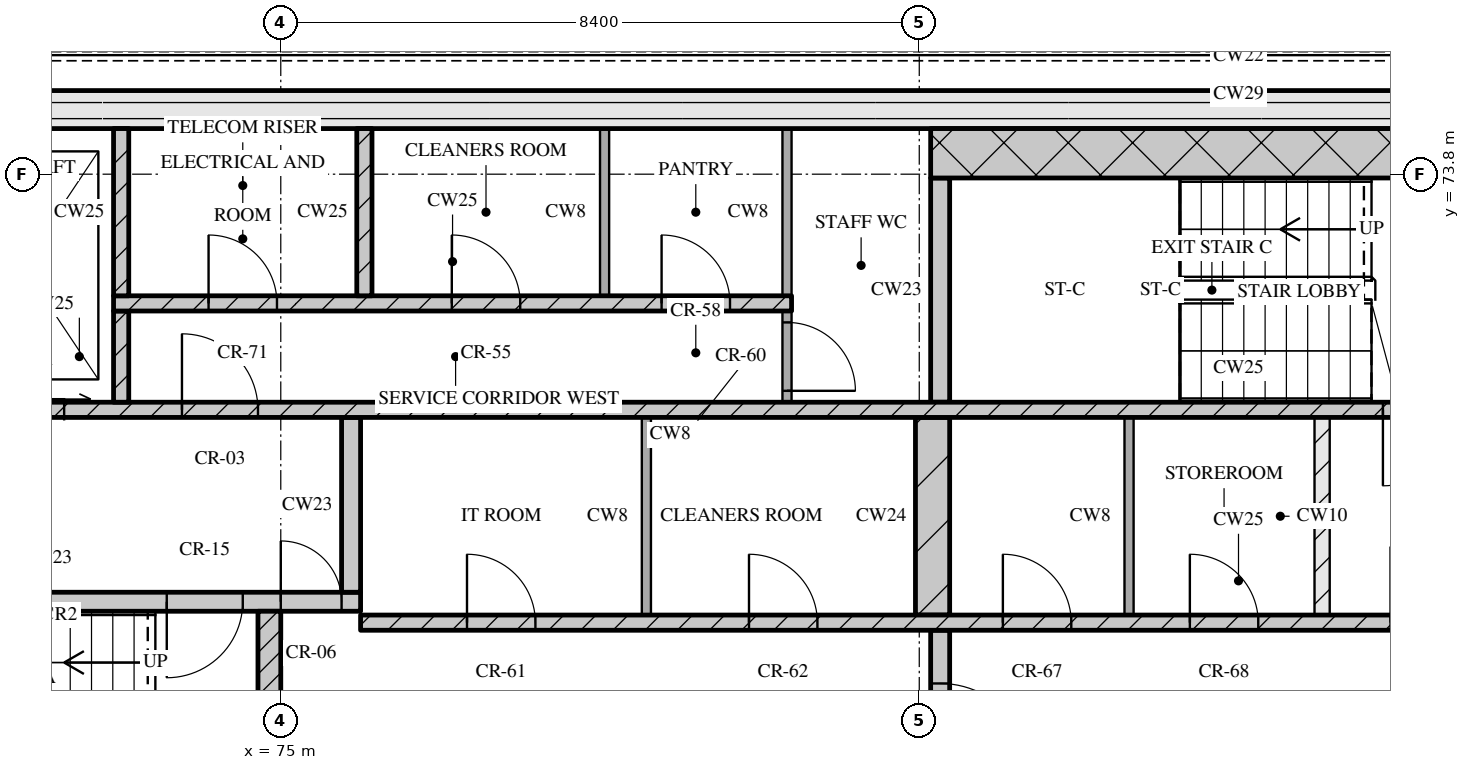
"""IFC4 building model, lengths in metres.
Left out: names, types, materials, properties, quantities, classifications, styles, units other than length and angle.
Written with IfcOpenShell. Run it as: python <this file> out.ifc"""

import sys

from ifc_helpers import new_model, si_unit, direction, frame, frame_2d, origin, place, context, subcontext, project, spatial, rectangle, extrude, element, fill, save


model = new_model("IFC4")
c1 = context("Model", 3, precision=1e-05, world=origin(), true_north=direction((0.0, 1.0)))
c2 = subcontext(c1, "Body", "Model", "MODEL_VIEW")
j1 = project(units=[si_unit("LENGTHUNIT", "METRE"), si_unit("PLANEANGLEUNIT", "RADIAN")], contexts=[c1])
p1 = place(None, origin())
s1 = spatial("IfcSite", under=j1, at=p1, CompositionType="ELEMENT")
p2 = place(p1, origin())
s2 = spatial("IfcBuilding", under=s1, at=p2, CompositionType="ELEMENT")
p3 = place(p2, frame((0.0, 0.0, 306.75)))
s3 = spatial("IfcBuildingStorey", under=s2, at=p3, CompositionType="ELEMENT", Elevation=306.75)
p4 = place(p3, frame((67.3, 74.65, 0.0), z_axis=(0.0, 0.0, 1.0), x_axis=(1.0, 0.0, 0.0)))
e1 = element("IfcWall", 1, at=p4, inside=s3, PredefinedType="SOLIDWALL", context=c2, shape_type="SweptSolid", body=[
    extrude(rectangle(XDim=40.6, YDim=0.5, at=frame_2d((20.3, 0.0))), origin(), (0.0, 0.0, 1.0), 3.3),
])
p5 = place(p3, frame((74.85, 65.2, 0.0), z_axis=(0.0, 0.0, 1.0), x_axis=(0.0, 1.0, 0.0)))
e2 = element("IfcWall", 2, at=p5, inside=s3, PredefinedType="SOLIDWALL", context=c2, shape_type="SweptSolid", body=[
    extrude(rectangle(XDim=2.85, YDim=0.3, at=frame_2d((1.425, 0.0))), origin(), (0.0, 0.0, 1.0), 3.3),
])
p6 = place(p3, frame((83.675, 65.2, 0.0), z_axis=(0.0, 0.0, 1.0), x_axis=(0.0, 1.0, 0.0)))
e3 = element("IfcWall", 3, at=p6, inside=s3, PredefinedType="SOLIDWALL", context=c2, shape_type="SweptSolid", body=[
    extrude(rectangle(XDim=2.6, YDim=0.25, at=frame_2d((1.3, 0.0))), origin(), (0.0, 0.0, 1.0), 3.3),
])
p7 = place(p6, frame((0.7, 0.0, 0.0)))
e4 = element("IfcOpeningElement", 4, at=p7, cuts=e3, PredefinedType="OPENING", context=c2, shape_type="SweptSolid", body=[
    extrude(rectangle(XDim=1.2, YDim=2.1, at=frame_2d((0.6, 1.05))), frame((0.0, 0.135, 0.0), z_axis=(0.0, -1.0, 0.0), x_axis=(1.0, 0.0, 0.0)), (0.0, 0.0, 1.0), 0.27),
])
p8 = place(p3, frame((76.05, 67.9, 0.0), z_axis=(0.0, 0.0, 1.0), x_axis=(1.0, 0.0, 0.0)))
e5 = element("IfcWall", 5, at=p8, inside=s3, PredefinedType="SOLIDWALL", context=c2, shape_type="SweptSolid", body=[
    extrude(rectangle(XDim=23.1, YDim=0.2, at=frame_2d((11.55, 0.0))), origin(), (0.0, 0.0, 1.0), 3.3),
])
p9 = place(p8, frame((1.4, 0.0, 0.0)))
e6 = element("IfcOpeningElement", 6, at=p9, cuts=e5, PredefinedType="OPENING", context=c2, shape_type="SweptSolid", body=[
    extrude(rectangle(XDim=0.9, YDim=2.1, at=frame_2d((0.45, 1.05))), frame((0.0, 0.11, 0.0), z_axis=(0.0, -1.0, 0.0), x_axis=(1.0, 0.0, 0.0)), (0.0, 0.0, 1.0), 0.22),
])
p10 = place(p8, frame((5.11, 0.0, 0.0)))
e7 = element("IfcOpeningElement", 7, at=p10, cuts=e5, PredefinedType="OPENING", context=c2, shape_type="SweptSolid", body=[
    extrude(rectangle(XDim=0.9, YDim=2.1, at=frame_2d((0.45, 1.05))), frame((0.0, 0.11, 0.0), z_axis=(0.0, -1.0, 0.0), x_axis=(1.0, 0.0, 0.0)), (0.0, 0.0, 1.0), 0.22),
])
p11 = place(p8, frame((8.45, 0.0, 0.0)))
e8 = element("IfcOpeningElement", 8, at=p11, cuts=e5, PredefinedType="OPENING", context=c2, shape_type="SweptSolid", body=[
    extrude(rectangle(XDim=0.9, YDim=2.1, at=frame_2d((0.45, 1.05))), frame((0.0, 0.11, 0.0), z_axis=(0.0, -1.0, 0.0), x_axis=(1.0, 0.0, 0.0)), (0.0, 0.0, 1.0), 0.22),
])
p12 = place(p8, frame((10.91, 0.0, 0.0)))
e9 = element("IfcOpeningElement", 9, at=p12, cuts=e5, PredefinedType="OPENING", context=c2, shape_type="SweptSolid", body=[
    extrude(rectangle(XDim=0.9, YDim=2.1, at=frame_2d((0.45, 1.05))), frame((0.0, 0.11, 0.0), z_axis=(0.0, -1.0, 0.0), x_axis=(1.0, 0.0, 0.0)), (0.0, 0.0, 1.0), 0.22),
])
p13 = place(p8, frame((13.55, 0.0, 0.0)))
e10 = element("IfcOpeningElement", 10, at=p13, cuts=e5, PredefinedType="OPENING", context=c2, shape_type="SweptSolid", body=[
    extrude(rectangle(XDim=1.0, YDim=2.1, at=frame_2d((0.5, 1.05))), frame((0.0, 0.11, 0.0), z_axis=(0.0, -1.0, 0.0), x_axis=(1.0, 0.0, 0.0)), (0.0, 0.0, 1.0), 0.22),
])
p14 = place(p8, frame((16.2, 0.0, 0.0)))
e11 = element("IfcOpeningElement", 11, at=p14, cuts=e5, PredefinedType="OPENING", context=c2, shape_type="SweptSolid", body=[
    extrude(rectangle(XDim=1.1, YDim=2.1, at=frame_2d((0.55, 1.05))), frame((0.0, 0.11, 0.0), z_axis=(0.0, -1.0, 0.0), x_axis=(1.0, 0.0, 0.0)), (0.0, 0.0, 1.0), 0.22),
])
p15 = place(p8, frame((18.7, 0.0, 0.0)))
e12 = element("IfcOpeningElement", 12, at=p15, cuts=e5, PredefinedType="OPENING", context=c2, shape_type="SweptSolid", body=[
    extrude(rectangle(XDim=1.1, YDim=2.1, at=frame_2d((0.55, 1.05))), frame((0.0, 0.11, 0.0), z_axis=(0.0, -1.0, 0.0), x_axis=(1.0, 0.0, 0.0)), (0.0, 0.0, 1.0), 0.22),
])
p16 = place(p8, frame((21.2, 0.0, 0.0)))
e13 = element("IfcOpeningElement", 13, at=p16, cuts=e5, PredefinedType="OPENING", context=c2, shape_type="SweptSolid", body=[
    extrude(rectangle(XDim=1.1, YDim=2.1, at=frame_2d((0.55, 1.05))), frame((0.0, 0.11, 0.0), z_axis=(0.0, -1.0, 0.0), x_axis=(1.0, 0.0, 0.0)), (0.0, 0.0, 1.0), 0.22),
])
p17 = place(p3, frame((79.81, 68.0, 0.0), z_axis=(0.0, 0.0, 1.0), x_axis=(0.0, 1.0, 0.0)))
e14 = element("IfcWall", 14, at=p17, inside=s3, PredefinedType="PARTITIONING", context=c2, shape_type="SweptSolid", body=[
    extrude(rectangle(XDim=2.6, YDim=0.12, at=frame_2d((1.3, 0.0))), origin(), (0.0, 0.0, 1.0), 3.3),
])
p18 = place(p3, frame((83.575, 68.0, 0.0), z_axis=(0.0, 0.0, 1.0), x_axis=(0.0, 1.0, 0.0)))
e15 = element("IfcWall", 15, at=p18, inside=s3, PredefinedType="SOLIDWALL", context=c2, shape_type="SweptSolid", body=[
    extrude(rectangle(XDim=2.6, YDim=0.45, at=frame_2d((1.3, 0.0))), origin(), (0.0, 0.0, 1.0), 3.3),
])
p19 = place(p3, frame((86.16, 68.0, 0.0), z_axis=(0.0, 0.0, 1.0), x_axis=(0.0, 1.0, 0.0)))
e16 = element("IfcWall", 16, at=p19, inside=s3, PredefinedType="PARTITIONING", context=c2, shape_type="SweptSolid", body=[
    extrude(rectangle(XDim=2.6, YDim=0.12, at=frame_2d((1.3, 0.0))), origin(), (0.0, 0.0, 1.0), 3.3),
])
p20 = place(p3, frame((88.7, 68.0, 0.0), z_axis=(0.0, 0.0, 1.0), x_axis=(0.0, 1.0, 0.0)))
e17 = element("IfcWall", 17, at=p20, inside=s3, PredefinedType="PARTITIONING", context=c2, shape_type="SweptSolid", body=[
    extrude(rectangle(XDim=2.6, YDim=0.2, at=frame_2d((1.3, 0.0))), origin(), (0.0, 0.0, 1.0), 3.3),
])
p21 = place(p3, frame((67.8, 68.175, 0.0), z_axis=(0.0, 0.0, 1.0), x_axis=(1.0, 0.0, 0.0)))
e18 = element("IfcWall", 18, at=p21, inside=s3, PredefinedType="SOLIDWALL", context=c2, shape_type="SweptSolid", body=[
    extrude(rectangle(XDim=8.25, YDim=0.25, at=frame_2d((4.125, 0.0))), origin(), (0.0, 0.0, 1.0), 3.3),
])
p22 = place(p21, frame((5.7, 0.0, 0.0)))
e19 = element("IfcOpeningElement", 19, at=p22, cuts=e18, PredefinedType="OPENING", context=c2, shape_type="SweptSolid", body=[
    extrude(rectangle(XDim=1.0, YDim=2.1, at=frame_2d((0.5, 1.05))), frame((0.0, 0.135, 0.0), z_axis=(0.0, -1.0, 0.0), x_axis=(1.0, 0.0, 0.0)), (0.0, 0.0, 1.0), 0.27),
])
p23 = place(p21, frame((7.2, 0.0, 0.0)))
e20 = element("IfcOpeningElement", 20, at=p23, cuts=e18, PredefinedType="OPENING", context=c2, shape_type="SweptSolid", body=[
    extrude(rectangle(XDim=0.8, YDim=2.1, at=frame_2d((0.4, 1.05))), frame((0.0, 0.135, 0.0), z_axis=(0.0, -1.0, 0.0), x_axis=(1.0, 0.0, 0.0)), (0.0, 0.0, 1.0), 0.27),
])
p24 = place(p3, frame((75.925, 68.3, 0.0), z_axis=(0.0, 0.0, 1.0), x_axis=(0.0, 1.0, 0.0)))
e21 = element("IfcWall", 21, at=p24, inside=s3, PredefinedType="SOLIDWALL", context=c2, shape_type="SweptSolid", body=[
    extrude(rectangle(XDim=2.3, YDim=0.25, at=frame_2d((1.15, 0.0))), origin(), (0.0, 0.0, 1.0), 3.3),
])
p25 = place(p3, frame((67.8, 70.7, 0.0), z_axis=(0.0, 0.0, 1.0), x_axis=(1.0, 0.0, 0.0)))
e22 = element("IfcWall", 22, at=p25, inside=s3, PredefinedType="SOLIDWALL", context=c2, shape_type="SweptSolid", body=[
    extrude(rectangle(XDim=39.6, YDim=0.2, at=frame_2d((19.8, 0.0))), origin(), (0.0, 0.0, 1.0), 3.3),
])
p26 = place(p25, frame((0.65, 0.0, 0.0)))
e23 = element("IfcOpeningElement", 23, at=p26, cuts=e22, PredefinedType="OPENING", context=c2, shape_type="SweptSolid", body=[
    extrude(rectangle(XDim=1.1, YDim=2.1, at=frame_2d((0.55, 1.05))), frame((0.0, 0.11, 0.0), z_axis=(0.0, -1.0, 0.0), x_axis=(1.0, 0.0, 0.0)), (0.0, 0.0, 1.0), 0.22),
])
p27 = place(p25, frame((3.25, 0.0, 0.0)))
e24 = element("IfcOpeningElement", 24, at=p27, cuts=e22, PredefinedType="OPENING", context=c2, shape_type="SweptSolid", body=[
    extrude(rectangle(XDim=1.1, YDim=2.1, at=frame_2d((0.55, 1.05))), frame((0.0, 0.11, 0.0), z_axis=(0.0, -1.0, 0.0), x_axis=(1.0, 0.0, 0.0)), (0.0, 0.0, 1.0), 0.22),
])
p28 = place(p25, frame((5.9, 0.0, 0.0)))
e25 = element("IfcOpeningElement", 25, at=p28, cuts=e22, PredefinedType="OPENING", context=c2, shape_type="SweptSolid", body=[
    extrude(rectangle(XDim=1.0, YDim=2.1, at=frame_2d((0.5, 1.05))), frame((0.0, 0.11, 0.0), z_axis=(0.0, -1.0, 0.0), x_axis=(1.0, 0.0, 0.0)), (0.0, 0.0, 1.0), 0.22),
])
p29 = place(p25, frame((21.7, 0.0, 0.0)))
e26 = element("IfcOpeningElement", 26, at=p29, cuts=e22, PredefinedType="OPENING", context=c2, shape_type="SweptSolid", body=[
    extrude(rectangle(XDim=1.0, YDim=2.1, at=frame_2d((0.5, 1.05))), frame((0.0, 0.11, 0.0), z_axis=(0.0, -1.0, 0.0), x_axis=(1.0, 0.0, 0.0)), (0.0, 0.0, 1.0), 0.22),
])
p30 = place(p25, frame((32.7, 0.0, 0.0)))
e27 = element("IfcOpeningElement", 27, at=p30, cuts=e22, PredefinedType="OPENING", context=c2, shape_type="SweptSolid", body=[
    extrude(rectangle(XDim=1.0, YDim=2.1, at=frame_2d((0.5, 1.05))), frame((0.0, 0.11, 0.0), z_axis=(0.0, -1.0, 0.0), x_axis=(1.0, 0.0, 0.0)), (0.0, 0.0, 1.0), 0.22),
])
p31 = place(p25, frame((35.25, 0.0, 0.0)))
e28 = element("IfcOpeningElement", 28, at=p31, cuts=e22, PredefinedType="OPENING", context=c2, shape_type="SweptSolid", body=[
    extrude(rectangle(XDim=1.1, YDim=2.1, at=frame_2d((0.55, 1.05))), frame((0.0, 0.11, 0.0), z_axis=(0.0, -1.0, 0.0), x_axis=(1.0, 0.0, 0.0)), (0.0, 0.0, 1.0), 0.22),
])
p32 = place(p25, frame((37.85, 0.0, 0.0)))
e29 = element("IfcOpeningElement", 29, at=p32, cuts=e22, PredefinedType="OPENING", context=c2, shape_type="SweptSolid", body=[
    extrude(rectangle(XDim=1.1, YDim=2.1, at=frame_2d((0.55, 1.05))), frame((0.0, 0.11, 0.0), z_axis=(0.0, -1.0, 0.0), x_axis=(1.0, 0.0, 0.0)), (0.0, 0.0, 1.0), 0.22),
])
p33 = place(p3, frame((72.9, 70.8, 0.0), z_axis=(0.0, 0.0, 1.0), x_axis=(0.0, 1.0, 0.0)))
e30 = element("IfcWall", 30, at=p33, inside=s3, PredefinedType="SOLIDWALL", context=c2, shape_type="SweptSolid", body=[
    extrude(rectangle(XDim=1.2, YDim=0.2, at=frame_2d((0.6, 0.0))), origin(), (0.0, 0.0, 1.0), 3.3),
])
p34 = place(p3, frame((81.66, 70.8, 0.0), z_axis=(0.0, 0.0, 1.0), x_axis=(0.0, 1.0, 0.0)))
e31 = element("IfcWall", 31, at=p34, inside=s3, PredefinedType="PARTITIONING", context=c2, shape_type="SweptSolid", body=[
    extrude(rectangle(XDim=1.2, YDim=0.12, at=frame_2d((0.6, 0.0))), origin(), (0.0, 0.0, 1.0), 3.3),
])
p35 = place(p34, frame((0.15, 0.0, 0.0)))
e32 = element("IfcOpeningElement", 32, at=p35, cuts=e31, PredefinedType="OPENING", context=c2, shape_type="SweptSolid", body=[
    extrude(rectangle(XDim=0.9, YDim=2.1, at=frame_2d((0.45, 1.05))), frame((0.0, 0.07, 0.0), z_axis=(0.0, -1.0, 0.0), x_axis=(1.0, 0.0, 0.0)), (0.0, 0.0, 1.0), 0.14),
])
p36 = place(p3, frame((83.675, 70.8, 0.0), z_axis=(0.0, 0.0, 1.0), x_axis=(0.0, 1.0, 0.0)))
e33 = element("IfcWall", 33, at=p36, inside=s3, PredefinedType="SOLIDWALL", context=c2, shape_type="SweptSolid", body=[
    extrude(rectangle(XDim=2.95, YDim=0.25, at=frame_2d((1.475, 0.0))), origin(), (0.0, 0.0, 1.0), 3.3),
])
p37 = place(p3, frame((72.8, 72.1, 0.0), z_axis=(0.0, 0.0, 1.0), x_axis=(1.0, 0.0, 0.0)))
e34 = element("IfcWall", 34, at=p37, inside=s3, PredefinedType="SOLIDWALL", context=c2, shape_type="SweptSolid", body=[
    extrude(rectangle(XDim=8.92, YDim=0.2, at=frame_2d((4.46, 0.0))), origin(), (0.0, 0.0, 1.0), 3.3),
])
p38 = place(p37, frame((1.25, 0.0, 0.0)))
e35 = element("IfcOpeningElement", 35, at=p38, cuts=e34, PredefinedType="OPENING", context=c2, shape_type="SweptSolid", body=[
    extrude(rectangle(XDim=0.9, YDim=2.1, at=frame_2d((0.45, 1.05))), frame((0.0, 0.11, 0.0), z_axis=(0.0, -1.0, 0.0), x_axis=(1.0, 0.0, 0.0)), (0.0, 0.0, 1.0), 0.22),
])
p39 = place(p37, frame((4.45, 0.0, 0.0)))
e36 = element("IfcOpeningElement", 36, at=p39, cuts=e34, PredefinedType="OPENING", context=c2, shape_type="SweptSolid", body=[
    extrude(rectangle(XDim=0.9, YDim=2.1, at=frame_2d((0.45, 1.05))), frame((0.0, 0.11, 0.0), z_axis=(0.0, -1.0, 0.0), x_axis=(1.0, 0.0, 0.0)), (0.0, 0.0, 1.0), 0.22),
])
p40 = place(p37, frame((7.21, 0.0, 0.0)))
e37 = element("IfcOpeningElement", 37, at=p40, cuts=e34, PredefinedType="OPENING", context=c2, shape_type="SweptSolid", body=[
    extrude(rectangle(XDim=0.9, YDim=2.1, at=frame_2d((0.45, 1.05))), frame((0.0, 0.11, 0.0), z_axis=(0.0, -1.0, 0.0), x_axis=(1.0, 0.0, 0.0)), (0.0, 0.0, 1.0), 0.22),
])
for number, where, z_axis, x_axis in (
    (38, (72.9, 72.2, 0.0), (0.0, 0.0, 1.0), (0.0, 1.0, 0.0)),
    (39, (76.1, 72.2, 0.0), (0.0, 0.0, 1.0), (0.0, 1.0, 0.0)),
):
    element("IfcWall", number, at=place(p3, frame(where, z_axis=z_axis, x_axis=x_axis)), inside=s3, PredefinedType="SOLIDWALL", context=c2, shape_type="SweptSolid", body=[
        extrude(rectangle(XDim=2.2, YDim=0.2, at=frame_2d((1.1, 0.0))), origin(), (0.0, 0.0, 1.0), 3.3),
    ])
for number, where, z_axis, x_axis in (
    (40, (79.26, 72.2, 0.0), (0.0, 0.0, 1.0), (0.0, 1.0, 0.0)),
    (41, (81.66, 72.2, 0.0), (0.0, 0.0, 1.0), (0.0, 1.0, 0.0)),
):
    element("IfcWall", number, at=place(p3, frame(where, z_axis=z_axis, x_axis=x_axis)), inside=s3, PredefinedType="PARTITIONING", context=c2, shape_type="SweptSolid", body=[
        extrude(rectangle(XDim=2.2, YDim=0.12, at=frame_2d((1.1, 0.0))), origin(), (0.0, 0.0, 1.0), 3.3),
    ])
p41 = place(p3, frame((83.55, 74.075, 0.0), z_axis=(0.0, 0.0, 1.0), x_axis=(1.0, 0.0, 0.0)))
e42 = element("IfcWall", 42, at=p41, inside=s3, PredefinedType="SOLIDWALL", context=c2, shape_type="SweptSolid", body=[
    extrude(rectangle(XDim=8.1, YDim=0.65, at=frame_2d((4.05, 0.0))), origin(), (0.0, 0.0, 1.0), 3.3),
])
p42 = place(p7, origin())
e43 = element("IfcDoor", 43, at=p42, inside=s3, OperationType="SINGLE_SWING_RIGHT", PredefinedType="DOOR", context=c2, shape_type="SweptSolid", body=[
    extrude(rectangle(XDim=1.2, YDim=2.1, at=frame_2d((0.6, 1.05))), frame((0.0, 0.025, 0.0), z_axis=(0.0, -1.0, 0.0), x_axis=(1.0, 0.0, 0.0)), (0.0, 0.0, 1.0), 0.05),
])
fill(e4, e43)
p43 = place(p9, origin())
e44 = element("IfcDoor", 44, at=p43, inside=s3, OperationType="SINGLE_SWING_LEFT", PredefinedType="DOOR", context=c2, shape_type="SweptSolid", body=[
    extrude(rectangle(XDim=0.9, YDim=2.1, at=frame_2d((0.45, 1.05))), frame((0.0, 0.025, 0.0), z_axis=(0.0, -1.0, 0.0), x_axis=(1.0, 0.0, 0.0)), (0.0, 0.0, 1.0), 0.05),
])
fill(e6, e44)
p44 = place(p10, origin())
e45 = element("IfcDoor", 45, at=p44, inside=s3, OperationType="SINGLE_SWING_LEFT", PredefinedType="DOOR", context=c2, shape_type="SweptSolid", body=[
    extrude(rectangle(XDim=0.9, YDim=2.1, at=frame_2d((0.45, 1.05))), frame((0.0, 0.025, 0.0), z_axis=(0.0, -1.0, 0.0), x_axis=(1.0, 0.0, 0.0)), (0.0, 0.0, 1.0), 0.05),
])
fill(e7, e45)
p45 = place(p11, origin())
e46 = element("IfcDoor", 46, at=p45, inside=s3, OperationType="SINGLE_SWING_LEFT", PredefinedType="DOOR", context=c2, shape_type="SweptSolid", body=[
    extrude(rectangle(XDim=0.9, YDim=2.1, at=frame_2d((0.45, 1.05))), frame((0.0, 0.025, 0.0), z_axis=(0.0, -1.0, 0.0), x_axis=(1.0, 0.0, 0.0)), (0.0, 0.0, 1.0), 0.05),
])
fill(e8, e46)
p46 = place(p12, origin())
e47 = element("IfcDoor", 47, at=p46, inside=s3, OperationType="SINGLE_SWING_LEFT", PredefinedType="DOOR", context=c2, shape_type="SweptSolid", body=[
    extrude(rectangle(XDim=0.9, YDim=2.1, at=frame_2d((0.45, 1.05))), frame((0.0, 0.025, 0.0), z_axis=(0.0, -1.0, 0.0), x_axis=(1.0, 0.0, 0.0)), (0.0, 0.0, 1.0), 0.05),
])
fill(e9, e47)
p47 = place(p22, origin())
e48 = element("IfcDoor", 48, at=p47, inside=s3, OperationType="SINGLE_SWING_RIGHT", PredefinedType="DOOR", context=c2, shape_type="SweptSolid", body=[
    extrude(rectangle(XDim=1.0, YDim=2.1, at=frame_2d((0.5, 1.05))), frame((0.0, 0.025, 0.0), z_axis=(0.0, -1.0, 0.0), x_axis=(1.0, 0.0, 0.0)), (0.0, 0.0, 1.0), 0.05),
])
fill(e19, e48)
p48 = place(p23, origin())
e49 = element("IfcDoor", 49, at=p48, inside=s3, OperationType="SINGLE_SWING_LEFT", PredefinedType="DOOR", context=c2, shape_type="SweptSolid", body=[
    extrude(rectangle(XDim=0.8, YDim=2.1, at=frame_2d((0.4, 1.05))), frame((0.0, 0.025, 0.0), z_axis=(0.0, -1.0, 0.0), x_axis=(1.0, 0.0, 0.0)), (0.0, 0.0, 1.0), 0.05),
])
fill(e20, e49)
p49 = place(p27, origin())
e50 = element("IfcDoor", 50, at=p49, inside=s3, OperationType="SLIDING_TO_RIGHT", PredefinedType="DOOR", context=c2, shape_type="SweptSolid", body=[
    extrude(rectangle(XDim=1.1, YDim=2.1, at=frame_2d((0.55, 1.05))), frame((0.0, 0.025, 0.0), z_axis=(0.0, -1.0, 0.0), x_axis=(1.0, 0.0, 0.0)), (0.0, 0.0, 1.0), 0.05),
])
fill(e24, e50)
p50 = place(p28, origin())
e51 = element("IfcDoor", 51, at=p50, inside=s3, OperationType="SINGLE_SWING_LEFT", PredefinedType="DOOR", context=c2, shape_type="SweptSolid", body=[
    extrude(rectangle(XDim=1.0, YDim=2.1, at=frame_2d((0.5, 1.05))), frame((0.0, 0.025, 0.0), z_axis=(0.0, -1.0, 0.0), x_axis=(1.0, 0.0, 0.0)), (0.0, 0.0, 1.0), 0.05),
])
fill(e25, e51)
p51 = place(p29, origin())
e52 = element("IfcDoor", 52, at=p51, inside=s3, OperationType="SINGLE_SWING_RIGHT", PredefinedType="DOOR", context=c2, shape_type="SweptSolid", body=[
    extrude(rectangle(XDim=1.0, YDim=2.1, at=frame_2d((0.5, 1.05))), frame((0.0, 0.025, 0.0), z_axis=(0.0, -1.0, 0.0), x_axis=(1.0, 0.0, 0.0)), (0.0, 0.0, 1.0), 0.05),
])
fill(e26, e52)
p52 = place(p35, origin())
e53 = element("IfcDoor", 53, at=p52, inside=s3, OperationType="SINGLE_SWING_RIGHT", PredefinedType="DOOR", context=c2, shape_type="SweptSolid", body=[
    extrude(rectangle(XDim=0.9, YDim=2.1, at=frame_2d((0.45, 1.05))), frame((0.0, 0.025, 0.0), z_axis=(0.0, -1.0, 0.0), x_axis=(1.0, 0.0, 0.0)), (0.0, 0.0, 1.0), 0.05),
])
fill(e32, e53)
p53 = place(p38, origin())
e54 = element("IfcDoor", 54, at=p53, inside=s3, OperationType="SINGLE_SWING_LEFT", PredefinedType="DOOR", context=c2, shape_type="SweptSolid", body=[
    extrude(rectangle(XDim=0.9, YDim=2.1, at=frame_2d((0.45, 1.05))), frame((0.0, 0.025, 0.0), z_axis=(0.0, -1.0, 0.0), x_axis=(1.0, 0.0, 0.0)), (0.0, 0.0, 1.0), 0.05),
])
fill(e35, e54)
p54 = place(p39, origin())
e55 = element("IfcDoor", 55, at=p54, inside=s3, OperationType="SINGLE_SWING_LEFT", PredefinedType="DOOR", context=c2, shape_type="SweptSolid", body=[
    extrude(rectangle(XDim=0.9, YDim=2.1, at=frame_2d((0.45, 1.05))), frame((0.0, 0.025, 0.0), z_axis=(0.0, -1.0, 0.0), x_axis=(1.0, 0.0, 0.0)), (0.0, 0.0, 1.0), 0.05),
])
fill(e36, e55)
p55 = place(p40, origin())
e56 = element("IfcDoor", 56, at=p55, inside=s3, OperationType="SINGLE_SWING_LEFT", PredefinedType="DOOR", context=c2, shape_type="SweptSolid", body=[
    extrude(rectangle(XDim=0.9, YDim=2.1, at=frame_2d((0.45, 1.05))), frame((0.0, 0.025, 0.0), z_axis=(0.0, -1.0, 0.0), x_axis=(1.0, 0.0, 0.0)), (0.0, 0.0, 1.0), 0.05),
])
fill(e37, e56)
save(model, sys.argv[1])
